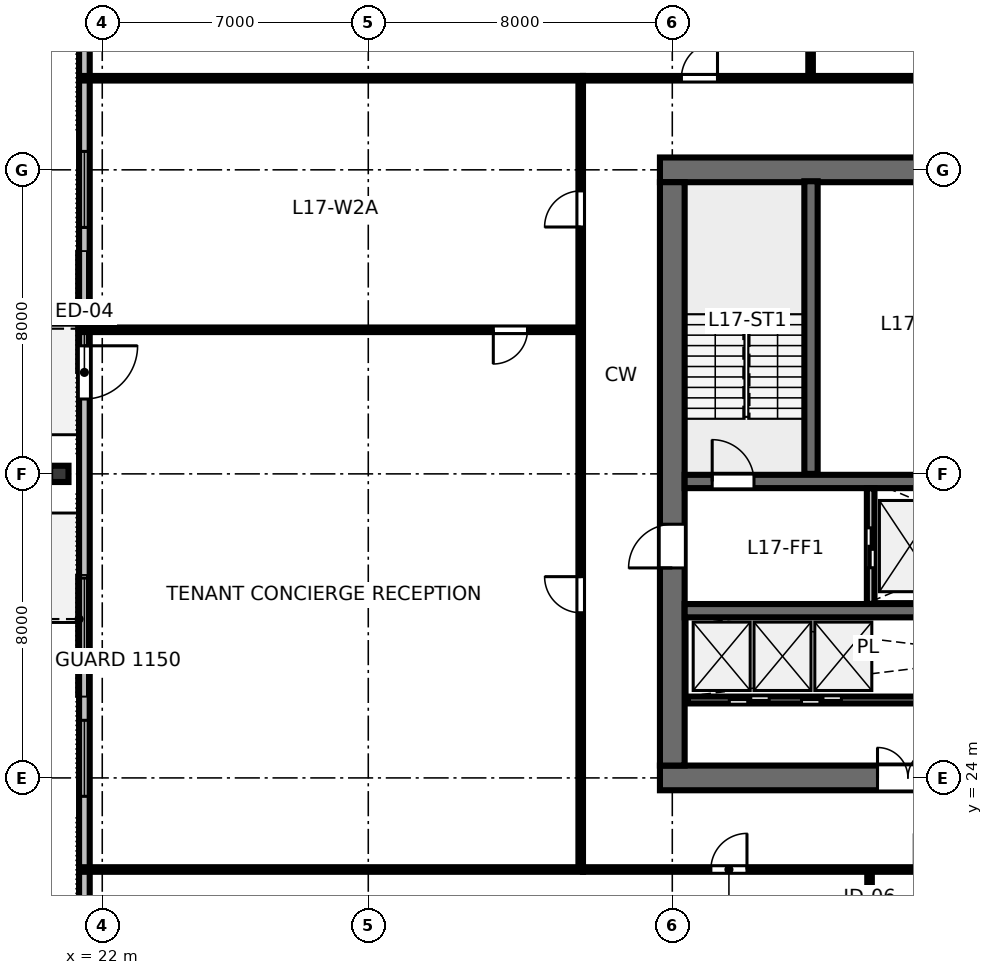
"""IFC4 building model, lengths in metres.
Left out: names, types, materials, properties, quantities, classifications, styles, units other than length and angle.
Written with IfcOpenShell. Run it as: python <this file> out.ifc"""

import sys

from ifc_helpers import new_model, si_unit, direction, frame, frame_2d, origin, origin_2d, place, context, subcontext, project, spatial, rectangle, i_section, extrude, element, fill, save


model = new_model("IFC4")
c1 = context("Model", 3, precision=1e-05, world=origin(), true_north=direction((0.0, 1.0)))
c2 = subcontext(c1, "Body", "Model", "MODEL_VIEW")
j1 = project(units=[si_unit("LENGTHUNIT", "METRE"), si_unit("PLANEANGLEUNIT", "RADIAN")], contexts=[c1])
p1 = place(None, origin())
s1 = spatial("IfcSite", under=j1, at=p1, CompositionType="ELEMENT")
p2 = place(p1, origin())
s2 = spatial("IfcBuilding", under=s1, at=p2, CompositionType="ELEMENT")
p3 = place(p2, frame((0.0, 0.0, 67.6)))
s3 = spatial("IfcBuildingStorey", under=s2, at=p3, CompositionType="ELEMENT", Elevation=67.6)
p4 = place(p3, frame((36.675, 24.0, 0.0), z_axis=(0.0, 0.0, 1.0), x_axis=(1.0, 0.0, 0.0)))
e1 = element("IfcWall", 1, at=p4, inside=s3, PredefinedType="SHEAR", context=c2, shape_type="SweptSolid", body=[
    extrude(rectangle(XDim=18.65, YDim=0.65, at=frame_2d((9.325, 0.0))), origin(), (0.0, 0.0, 1.0), 3.36),
])
p5 = place(p4, frame((5.725, 0.0, 0.0)))
e2 = element("IfcOpeningElement", 2, at=p5, cuts=e1, PredefinedType="OPENING", context=c2, shape_type="SweptSolid", body=[
    extrude(rectangle(XDim=1.6, YDim=2.15, at=frame_2d((0.8, 1.075))), frame((0.0, 0.335, 0.0), z_axis=(0.0, -1.0, 0.0), x_axis=(1.0, 0.0, 0.0)), (0.0, 0.0, 1.0), 0.67),
])
p6 = place(p4, frame((12.125, 0.0, 0.0)))
e3 = element("IfcOpeningElement", 3, at=p6, cuts=e1, PredefinedType="OPENING", context=c2, shape_type="SweptSolid", body=[
    extrude(rectangle(XDim=1.6, YDim=2.15, at=frame_2d((0.8, 1.075))), frame((0.0, 0.335, 0.0), z_axis=(0.0, -1.0, 0.0), x_axis=(1.0, 0.0, 0.0)), (0.0, 0.0, 1.0), 0.67),
])
p7 = place(p3, frame((36.675, 40.0, 0.0), z_axis=(0.0, 0.0, 1.0), x_axis=(1.0, 0.0, 0.0)))
e4 = element("IfcWall", 4, at=p7, inside=s3, PredefinedType="SHEAR", context=c2, shape_type="SweptSolid", body=[
    extrude(rectangle(XDim=18.65, YDim=0.65, at=frame_2d((9.325, 0.0))), origin(), (0.0, 0.0, 1.0), 3.36),
])
p8 = place(p7, frame((10.625, 0.0, 0.0)))
e5 = element("IfcOpeningElement", 5, at=p8, cuts=e4, PredefinedType="OPENING", context=c2, shape_type="SweptSolid", body=[
    extrude(rectangle(XDim=1.0, YDim=2.15, at=frame_2d((0.5, 1.075))), frame((0.0, 0.335, 0.0), z_axis=(0.0, -1.0, 0.0), x_axis=(1.0, 0.0, 0.0)), (0.0, 0.0, 1.0), 0.67),
])
p9 = place(p3, frame((37.0, 24.325, 0.0), z_axis=(0.0, 0.0, 1.0), x_axis=(0.0, 1.0, 0.0)))
e6 = element("IfcWall", 6, at=p9, inside=s3, PredefinedType="SHEAR", context=c2, shape_type="SweptSolid", body=[
    extrude(rectangle(XDim=15.35, YDim=0.65, at=frame_2d((7.675, 0.0))), origin(), (0.0, 0.0, 1.0), 3.36),
])
p10 = place(p9, frame((5.2, 0.0, 0.0)))
e7 = element("IfcOpeningElement", 7, at=p10, cuts=e6, PredefinedType="OPENING", context=c2, shape_type="SweptSolid", body=[
    extrude(rectangle(XDim=1.15, YDim=2.15, at=frame_2d((0.575, 1.075))), frame((0.0, 0.335, 0.0), z_axis=(0.0, -1.0, 0.0), x_axis=(1.0, 0.0, 0.0)), (0.0, 0.0, 1.0), 0.67),
])
p11 = place(p3, frame((37.325, 31.8, 0.0), z_axis=(0.0, 0.0, 1.0), x_axis=(1.0, 0.0, 0.0)))
e8 = element("IfcWall", 8, at=p11, inside=s3, PredefinedType="SHEAR", context=c2, shape_type="SweptSolid", body=[
    extrude(rectangle(XDim=17.35, YDim=0.35, at=frame_2d((8.675, 0.0))), origin(), (0.0, 0.0, 1.0), 3.36),
])
p12 = place(p11, frame((0.725, 0.0, 0.0)))
e9 = element("IfcOpeningElement", 9, at=p12, cuts=e8, PredefinedType="OPENING", context=c2, shape_type="SweptSolid", body=[
    extrude(rectangle(XDim=1.1, YDim=2.15, at=frame_2d((0.55, 1.075))), frame((0.0, 0.185, 0.0), z_axis=(0.0, -1.0, 0.0), x_axis=(1.0, 0.0, 0.0)), (0.0, 0.0, 1.0), 0.37),
])
p13 = place(p11, frame((14.625, 0.0, 0.0)))
e10 = element("IfcOpeningElement", 10, at=p13, cuts=e8, PredefinedType="OPENING", context=c2, shape_type="SweptSolid", body=[
    extrude(rectangle(XDim=1.1, YDim=2.15, at=frame_2d((0.55, 1.075))), frame((0.0, 0.185, 0.0), z_axis=(0.0, -1.0, 0.0), x_axis=(1.0, 0.0, 0.0)), (0.0, 0.0, 1.0), 0.37),
])
p14 = place(p3, frame((37.325, 28.4, 0.0), z_axis=(0.0, 0.0, 1.0), x_axis=(1.0, 0.0, 0.0)))
e11 = element("IfcWall", 11, at=p14, inside=s3, PredefinedType="SHEAR", context=c2, shape_type="SweptSolid", body=[
    extrude(rectangle(XDim=17.35, YDim=0.35, at=frame_2d((8.675, 0.0))), origin(), (0.0, 0.0, 1.0), 3.36),
])
p15 = place(p3, frame((20.87, 32.0, 0.0), z_axis=(-0.103698486948, 0.0, 0.994608779272), x_axis=(0.994608779272, 0.0, 0.103698486948)))
e12 = element("IfcColumn", 12, at=p15, inside=s3, PredefinedType="COLUMN", context=c2, shape_type="SweptSolid", body=[
    extrude(i_section(OverallWidth=0.428, OverallDepth=0.483, WebThickness=0.051, FlangeThickness=0.082, FilletRadius=0.025, at=origin_2d()), origin(), (0.0, 0.0, 1.0), 3.376),
])
p16 = place(p3, frame((21.53, 49.94, 0.0), z_axis=(0.0, 0.0, 1.0), x_axis=(0.0, -1.0, 0.0)))
e13 = element("IfcWall", 13, at=p16, inside=s3, PredefinedType="STANDARD", context=c2, shape_type="SweptSolid", body=[
    extrude(rectangle(XDim=35.88, YDim=0.28, at=frame_2d((17.94, 0.0))), origin(), (0.0, 0.0, 1.0), 3.36),
])
p17 = place(p16, frame((14.57, 0.0, 0.0)))
e14 = element("IfcOpeningElement", 14, at=p17, cuts=e13, PredefinedType="OPENING", context=c2, shape_type="SweptSolid", body=[
    extrude(rectangle(XDim=1.4, YDim=2.15, at=frame_2d((0.7, 1.075))), frame((0.0, 0.15, 0.0), z_axis=(0.0, -1.0, 0.0), x_axis=(1.0, 0.0, 0.0)), (0.0, 0.0, 1.0), 0.3),
])
p18 = place(p16, frame((1.971, 0.0, 0.8)))
e15 = element("IfcOpeningElement", 15, at=p18, cuts=e13, PredefinedType="OPENING", context=c2, shape_type="SweptSolid", body=[
    extrude(rectangle(XDim=2.0, YDim=1.95, at=frame_2d((1.0, 0.975))), frame((0.0, 0.15, 0.0), z_axis=(0.0, -1.0, 0.0), x_axis=(1.0, 0.0, 0.0)), (0.0, 0.0, 1.0), 0.3),
])
p19 = place(p16, frame((9.456, 0.0, 0.8)))
e16 = element("IfcOpeningElement", 16, at=p19, cuts=e13, PredefinedType="OPENING", context=c2, shape_type="SweptSolid", body=[
    extrude(rectangle(XDim=2.0, YDim=1.95, at=frame_2d((1.0, 0.975))), frame((0.0, 0.15, 0.0), z_axis=(0.0, -1.0, 0.0), x_axis=(1.0, 0.0, 0.0)), (0.0, 0.0, 1.0), 0.3),
])
p20 = place(p16, frame((20.682, 0.0, 0.8)))
e17 = element("IfcOpeningElement", 17, at=p20, cuts=e13, PredefinedType="OPENING", context=c2, shape_type="SweptSolid", body=[
    extrude(rectangle(XDim=2.0, YDim=1.95, at=frame_2d((1.0, 0.975))), frame((0.0, 0.15, 0.0), z_axis=(0.0, -1.0, 0.0), x_axis=(1.0, 0.0, 0.0)), (0.0, 0.0, 1.0), 0.3),
])
p21 = place(p16, frame((24.424, 0.0, 0.8)))
e18 = element("IfcOpeningElement", 18, at=p21, cuts=e13, PredefinedType="OPENING", context=c2, shape_type="SweptSolid", body=[
    extrude(rectangle(XDim=2.0, YDim=1.95, at=frame_2d((1.0, 0.975))), frame((0.0, 0.15, 0.0), z_axis=(0.0, -1.0, 0.0), x_axis=(1.0, 0.0, 0.0)), (0.0, 0.0, 1.0), 0.3),
])
p22 = place(p16, frame((31.909, 0.0, 0.8)))
e19 = element("IfcOpeningElement", 19, at=p22, cuts=e13, PredefinedType="OPENING", context=c2, shape_type="SweptSolid", body=[
    extrude(rectangle(XDim=2.0, YDim=1.95, at=frame_2d((1.0, 0.975))), frame((0.0, 0.15, 0.0), z_axis=(0.0, -1.0, 0.0), x_axis=(1.0, 0.0, 0.0)), (0.0, 0.0, 1.0), 0.3),
])
p23 = place(p3, frame((40.65, 32.0, 0.0), z_axis=(0.0, 0.0, 1.0), x_axis=(0.0, 1.0, 0.0)))
e20 = element("IfcWall", 20, at=p23, inside=s3, PredefinedType="SHEAR", context=c2, shape_type="SweptSolid", body=[
    extrude(rectangle(XDim=7.7, YDim=0.35, at=frame_2d((3.85, 0.0))), origin(), (0.0, 0.0, 1.0), 3.6),
])
p24 = place(p3, frame((42.22, 28.58, 0.0), z_axis=(0.0, 0.0, 1.0), x_axis=(0.0, 1.0, 0.0)))
e21 = element("IfcWall", 21, at=p24, inside=s3, PredefinedType="PARTITIONING", context=c2, shape_type="SweptSolid", body=[
    extrude(rectangle(XDim=3.04, YDim=0.2, at=frame_2d((1.52, 0.0))), origin(), (0.0, 0.0, 1.0), 3.36),
])
p25 = place(p24, frame((0.95, 0.0, 0.0)))
e22 = element("IfcOpeningElement", 22, at=p25, cuts=e21, PredefinedType="OPENING", context=c2, shape_type="SweptSolid", body=[
    extrude(rectangle(XDim=1.05, YDim=2.15, at=frame_2d((0.525, 1.075))), frame((0.0, 0.11, 0.0), z_axis=(0.0, -1.0, 0.0), x_axis=(1.0, 0.0, 0.0)), (0.0, 0.0, 1.0), 0.22),
])
p26 = place(p3, frame((37.4, 26.05, 0.0), z_axis=(0.0, 0.0, 1.0), x_axis=(1.0, 0.0, 0.0)))
e23 = element("IfcWall", 23, at=p26, inside=s3, PredefinedType="PARTITIONING", context=c2, shape_type="SweptSolid", body=[
    extrude(rectangle(XDim=17.2, YDim=0.18, at=frame_2d((8.6, 0.0))), origin(), (0.0, 0.0, 1.0), 3.36),
])
p27 = place(p26, frame((1.1, 0.0, 0.0)))
e24 = element("IfcOpeningElement", 24, at=p27, cuts=e23, PredefinedType="OPENING", context=c2, shape_type="SweptSolid", body=[
    extrude(rectangle(XDim=1.05, YDim=2.15, at=frame_2d((0.525, 1.075))), frame((0.0, 0.1, 0.0), z_axis=(0.0, -1.0, 0.0), x_axis=(1.0, 0.0, 0.0)), (0.0, 0.0, 1.0), 0.2),
])
p28 = place(p26, frame((3.0, 0.0, 0.0)))
e25 = element("IfcOpeningElement", 25, at=p28, cuts=e23, PredefinedType="OPENING", context=c2, shape_type="SweptSolid", body=[
    extrude(rectangle(XDim=1.05, YDim=2.15, at=frame_2d((0.525, 1.075))), frame((0.0, 0.1, 0.0), z_axis=(0.0, -1.0, 0.0), x_axis=(1.0, 0.0, 0.0)), (0.0, 0.0, 1.0), 0.2),
])
p29 = place(p3, frame((42.191, 21.59, 0.0), z_axis=(0.0, 0.0, 1.0), x_axis=(0.0, -1.0, 0.0)))
e26 = element("IfcWall", 26, at=p29, inside=s3, PredefinedType="PARTITIONING", context=c2, shape_type="SweptSolid", body=[
    extrude(rectangle(XDim=11.11, YDim=0.12, at=frame_2d((5.555, 0.0))), origin(), (0.0, 0.0, 1.0), 2.64),
])
p30 = place(p29, frame((1.4, 0.0, 0.0)))
e27 = element("IfcOpeningElement", 27, at=p30, cuts=e26, PredefinedType="OPENING", context=c2, shape_type="SweptSolid", body=[
    extrude(rectangle(XDim=0.9, YDim=2.15, at=frame_2d((0.45, 1.075))), frame((0.0, 0.07, 0.0), z_axis=(0.0, -1.0, 0.0), x_axis=(1.0, 0.0, 0.0)), (0.0, 0.0, 1.0), 0.14),
])
p31 = place(p3, frame((34.65, 21.59, 0.0), z_axis=(0.0, 0.0, 1.0), x_axis=(1.0, 0.0, 0.0)))
e28 = element("IfcWall", 28, at=p31, inside=s3, PredefinedType="PARTITIONING", context=c2, shape_type="SweptSolid", body=[
    extrude(rectangle(XDim=22.7, YDim=0.12, at=frame_2d((11.35, 0.0))), origin(), (0.0, 0.0, 1.0), 2.64),
])
p32 = place(p31, frame((3.365, 0.0, 0.0)))
e29 = element("IfcOpeningElement", 29, at=p32, cuts=e28, PredefinedType="OPENING", context=c2, shape_type="SweptSolid", body=[
    extrude(rectangle(XDim=0.95, YDim=2.15, at=frame_2d((0.475, 1.075))), frame((0.0, 0.07, 0.0), z_axis=(0.0, -1.0, 0.0), x_axis=(1.0, 0.0, 0.0)), (0.0, 0.0, 1.0), 0.14),
])
p33 = place(p31, frame((8.718, 0.0, 0.0)))
e30 = element("IfcOpeningElement", 30, at=p33, cuts=e28, PredefinedType="OPENING", context=c2, shape_type="SweptSolid", body=[
    extrude(rectangle(XDim=0.95, YDim=2.15, at=frame_2d((0.475, 1.075))), frame((0.0, 0.07, 0.0), z_axis=(0.0, -1.0, 0.0), x_axis=(1.0, 0.0, 0.0)), (0.0, 0.0, 1.0), 0.14),
])
p34 = place(p31, frame((13.651, 0.0, 0.0)))
e31 = element("IfcOpeningElement", 31, at=p34, cuts=e28, PredefinedType="OPENING", context=c2, shape_type="SweptSolid", body=[
    extrude(rectangle(XDim=0.95, YDim=2.15, at=frame_2d((0.475, 1.075))), frame((0.0, 0.07, 0.0), z_axis=(0.0, -1.0, 0.0), x_axis=(1.0, 0.0, 0.0)), (0.0, 0.0, 1.0), 0.14),
])
p35 = place(p31, frame((19.509, 0.0, 0.0)))
e32 = element("IfcOpeningElement", 32, at=p35, cuts=e28, PredefinedType="OPENING", context=c2, shape_type="SweptSolid", body=[
    extrude(rectangle(XDim=0.95, YDim=2.15, at=frame_2d((0.475, 1.075))), frame((0.0, 0.07, 0.0), z_axis=(0.0, -1.0, 0.0), x_axis=(1.0, 0.0, 0.0)), (0.0, 0.0, 1.0), 0.14),
])
p36 = place(p3, frame((40.639, 42.41, 0.0), z_axis=(0.0, 0.0, 1.0), x_axis=(0.0, 1.0, 0.0)))
e33 = element("IfcWall", 33, at=p36, inside=s3, PredefinedType="PARTITIONING", context=c2, shape_type="SweptSolid", body=[
    extrude(rectangle(XDim=11.11, YDim=0.12, at=frame_2d((5.555, 0.0))), origin(), (0.0, 0.0, 1.0), 2.64),
])
p37 = place(p36, frame((1.4, 0.0, 0.0)))
e34 = element("IfcOpeningElement", 34, at=p37, cuts=e33, PredefinedType="OPENING", context=c2, shape_type="SweptSolid", body=[
    extrude(rectangle(XDim=0.9, YDim=2.15, at=frame_2d((0.45, 1.075))), frame((0.0, 0.07, 0.0), z_axis=(0.0, -1.0, 0.0), x_axis=(1.0, 0.0, 0.0)), (0.0, 0.0, 1.0), 0.14),
])
p38 = place(p3, frame((34.65, 42.41, 0.0), z_axis=(0.0, 0.0, 1.0), x_axis=(1.0, 0.0, 0.0)))
e35 = element("IfcWall", 35, at=p38, inside=s3, PredefinedType="PARTITIONING", context=c2, shape_type="SweptSolid", body=[
    extrude(rectangle(XDim=22.7, YDim=0.12, at=frame_2d((11.35, 0.0))), origin(), (0.0, 0.0, 1.0), 2.64),
])
p39 = place(p38, frame((2.59, 0.0, 0.0)))
e36 = element("IfcOpeningElement", 36, at=p39, cuts=e35, PredefinedType="OPENING", context=c2, shape_type="SweptSolid", body=[
    extrude(rectangle(XDim=0.95, YDim=2.15, at=frame_2d((0.475, 1.075))), frame((0.0, 0.07, 0.0), z_axis=(0.0, -1.0, 0.0), x_axis=(1.0, 0.0, 0.0)), (0.0, 0.0, 1.0), 0.14),
])
p40 = place(p38, frame((8.768, 0.0, 0.0)))
e37 = element("IfcOpeningElement", 37, at=p40, cuts=e35, PredefinedType="OPENING", context=c2, shape_type="SweptSolid", body=[
    extrude(rectangle(XDim=0.95, YDim=2.15, at=frame_2d((0.475, 1.075))), frame((0.0, 0.07, 0.0), z_axis=(0.0, -1.0, 0.0), x_axis=(1.0, 0.0, 0.0)), (0.0, 0.0, 1.0), 0.14),
])
p41 = place(p38, frame((14.079, 0.0, 0.0)))
e38 = element("IfcOpeningElement", 38, at=p41, cuts=e35, PredefinedType="OPENING", context=c2, shape_type="SweptSolid", body=[
    extrude(rectangle(XDim=0.95, YDim=2.15, at=frame_2d((0.475, 1.075))), frame((0.0, 0.07, 0.0), z_axis=(0.0, -1.0, 0.0), x_axis=(1.0, 0.0, 0.0)), (0.0, 0.0, 1.0), 0.14),
])
p42 = place(p38, frame((19.11, 0.0, 0.0)))
e39 = element("IfcOpeningElement", 39, at=p42, cuts=e35, PredefinedType="OPENING", context=c2, shape_type="SweptSolid", body=[
    extrude(rectangle(XDim=0.95, YDim=2.15, at=frame_2d((0.475, 1.075))), frame((0.0, 0.07, 0.0), z_axis=(0.0, -1.0, 0.0), x_axis=(1.0, 0.0, 0.0)), (0.0, 0.0, 1.0), 0.14),
])
p43 = place(p3, frame((34.59, 35.791, 0.0), z_axis=(0.0, 0.0, 1.0), x_axis=(-1.0, 0.0, 0.0)))
e40 = element("IfcWall", 40, at=p43, inside=s3, PredefinedType="PARTITIONING", context=c2, shape_type="SweptSolid", body=[
    extrude(rectangle(XDim=13.06, YDim=0.12, at=frame_2d((6.53, 0.0))), origin(), (0.0, 0.0, 1.0), 2.64),
])
p44 = place(p43, frame((1.4, 0.0, 0.0)))
e41 = element("IfcOpeningElement", 41, at=p44, cuts=e40, PredefinedType="OPENING", context=c2, shape_type="SweptSolid", body=[
    extrude(rectangle(XDim=0.9, YDim=2.15, at=frame_2d((0.45, 1.075))), frame((0.0, 0.07, 0.0), z_axis=(0.0, -1.0, 0.0), x_axis=(1.0, 0.0, 0.0)), (0.0, 0.0, 1.0), 0.14),
])
p45 = place(p3, frame((34.59, 21.65, 0.0), z_axis=(0.0, 0.0, 1.0), x_axis=(0.0, 1.0, 0.0)))
e42 = element("IfcWall", 42, at=p45, inside=s3, PredefinedType="PARTITIONING", context=c2, shape_type="SweptSolid", body=[
    extrude(rectangle(XDim=20.7, YDim=0.12, at=frame_2d((10.35, 0.0))), origin(), (0.0, 0.0, 1.0), 2.64),
])
p46 = place(p45, frame((6.696, 0.0, 0.0)))
e43 = element("IfcOpeningElement", 43, at=p46, cuts=e42, PredefinedType="OPENING", context=c2, shape_type="SweptSolid", body=[
    extrude(rectangle(XDim=0.95, YDim=2.15, at=frame_2d((0.475, 1.075))), frame((0.0, 0.07, 0.0), z_axis=(0.0, -1.0, 0.0), x_axis=(1.0, 0.0, 0.0)), (0.0, 0.0, 1.0), 0.14),
])
p47 = place(p45, frame((16.846, 0.0, 0.0)))
e44 = element("IfcOpeningElement", 44, at=p47, cuts=e42, PredefinedType="OPENING", context=c2, shape_type="SweptSolid", body=[
    extrude(rectangle(XDim=0.95, YDim=2.15, at=frame_2d((0.475, 1.075))), frame((0.0, 0.07, 0.0), z_axis=(0.0, -1.0, 0.0), x_axis=(1.0, 0.0, 0.0)), (0.0, 0.0, 1.0), 0.14),
])
for number, where, z_axis, x_axis in (
    (45, (34.65, 21.59, 0.0), (0.0, 0.0, 1.0), (-1.0, 0.0, 0.0)),
    (46, (34.65, 42.41, 0.0), (0.0, 0.0, 1.0), (-1.0, 0.0, 0.0)),
):
    element("IfcWall", number, at=place(p3, frame(where, z_axis=z_axis, x_axis=x_axis)), inside=s3, PredefinedType="PARTITIONING", context=c2, shape_type="SweptSolid", body=[
        extrude(rectangle(XDim=13.12, YDim=0.12, at=frame_2d((6.56, 0.0))), origin(), (0.0, 0.0, 1.0), 2.64),
    ])
p48 = place(p17, origin())
e47 = element("IfcDoor", 47, at=p48, inside=s3, OperationType="SINGLE_SWING_LEFT", PredefinedType="DOOR", context=c2, shape_type="SweptSolid", body=[
    extrude(rectangle(XDim=1.4, YDim=2.15, at=frame_2d((0.7, 1.075))), frame((0.0, 0.025, 0.0), z_axis=(0.0, -1.0, 0.0), x_axis=(1.0, 0.0, 0.0)), (0.0, 0.0, 1.0), 0.05),
])
fill(e14, e47)
p49 = place(p19, origin())
e48 = element("IfcWindow", 48, at=p49, inside=s3, PartitioningType="SINGLE_PANEL", PredefinedType="WINDOW", context=c2, shape_type="SweptSolid", body=[
    extrude(rectangle(XDim=2.0, YDim=1.95, at=frame_2d((1.0, 0.975))), frame((0.0, 0.03, 0.0), z_axis=(0.0, -1.0, 0.0), x_axis=(1.0, 0.0, 0.0)), (0.0, 0.0, 1.0), 0.06),
])
fill(e16, e48)
p50 = place(p20, origin())
e49 = element("IfcWindow", 49, at=p50, inside=s3, PartitioningType="SINGLE_PANEL", PredefinedType="WINDOW", context=c2, shape_type="SweptSolid", body=[
    extrude(rectangle(XDim=2.0, YDim=1.95, at=frame_2d((1.0, 0.975))), frame((0.0, 0.03, 0.0), z_axis=(0.0, -1.0, 0.0), x_axis=(1.0, 0.0, 0.0)), (0.0, 0.0, 1.0), 0.06),
])
fill(e17, e49)
p51 = place(p21, origin())
e50 = element("IfcWindow", 50, at=p51, inside=s3, PartitioningType="SINGLE_PANEL", PredefinedType="WINDOW", context=c2, shape_type="SweptSolid", body=[
    extrude(rectangle(XDim=2.0, YDim=1.95, at=frame_2d((1.0, 0.975))), frame((0.0, 0.03, 0.0), z_axis=(0.0, -1.0, 0.0), x_axis=(1.0, 0.0, 0.0)), (0.0, 0.0, 1.0), 0.06),
])
fill(e18, e50)
p52 = place(p12, origin())
e51 = element("IfcDoor", 51, at=p52, inside=s3, OperationType="SINGLE_SWING_LEFT", PredefinedType="DOOR", context=c2, shape_type="SweptSolid", body=[
    extrude(rectangle(XDim=1.1, YDim=2.15, at=frame_2d((0.55, 1.075))), frame((0.0, 0.025, 0.0), z_axis=(0.0, -1.0, 0.0), x_axis=(1.0, 0.0, 0.0)), (0.0, 0.0, 1.0), 0.05),
])
fill(e9, e51)
p53 = place(p10, origin())
e52 = element("IfcDoor", 52, at=p53, inside=s3, OperationType="SINGLE_SWING_LEFT", PredefinedType="DOOR", context=c2, shape_type="SweptSolid", body=[
    extrude(rectangle(XDim=1.15, YDim=2.15, at=frame_2d((0.575, 1.075))), frame((0.0, 0.025, 0.0), z_axis=(0.0, -1.0, 0.0), x_axis=(1.0, 0.0, 0.0)), (0.0, 0.0, 1.0), 0.05),
])
fill(e7, e52)
p54 = place(p5, origin())
e53 = element("IfcDoor", 53, at=p54, inside=s3, OperationType="DOUBLE_DOOR_SINGLE_SWING", PredefinedType="DOOR", context=c2, shape_type="SweptSolid", body=[
    extrude(rectangle(XDim=1.6, YDim=2.15, at=frame_2d((0.8, 1.075))), frame((0.0, 0.025, 0.0), z_axis=(0.0, -1.0, 0.0), x_axis=(1.0, 0.0, 0.0)), (0.0, 0.0, 1.0), 0.05),
])
fill(e2, e53)
p55 = place(p25, origin())
e54 = element("IfcDoor", 54, at=p55, inside=s3, OperationType="SLIDING_TO_LEFT", PredefinedType="DOOR", context=c2, shape_type="SweptSolid", body=[
    extrude(rectangle(XDim=1.05, YDim=2.15, at=frame_2d((0.525, 1.075))), frame((0.0, 0.025, 0.0), z_axis=(0.0, -1.0, 0.0), x_axis=(1.0, 0.0, 0.0)), (0.0, 0.0, 1.0), 0.05),
])
fill(e22, e54)
p56 = place(p27, origin())
e55 = element("IfcDoor", 55, at=p56, inside=s3, OperationType="SLIDING_TO_LEFT", PredefinedType="DOOR", context=c2, shape_type="SweptSolid", body=[
    extrude(rectangle(XDim=1.05, YDim=2.15, at=frame_2d((0.525, 1.075))), frame((0.0, 0.025, 0.0), z_axis=(0.0, -1.0, 0.0), x_axis=(1.0, 0.0, 0.0)), (0.0, 0.0, 1.0), 0.05),
])
fill(e24, e55)
p57 = place(p28, origin())
e56 = element("IfcDoor", 56, at=p57, inside=s3, OperationType="SLIDING_TO_RIGHT", PredefinedType="DOOR", context=c2, shape_type="SweptSolid", body=[
    extrude(rectangle(XDim=1.05, YDim=2.15, at=frame_2d((0.525, 1.075))), frame((0.0, 0.025, 0.0), z_axis=(0.0, -1.0, 0.0), x_axis=(1.0, 0.0, 0.0)), (0.0, 0.0, 1.0), 0.05),
])
fill(e25, e56)
p58 = place(p32, origin())
e57 = element("IfcDoor", 57, at=p58, inside=s3, OperationType="SINGLE_SWING_RIGHT", PredefinedType="DOOR", context=c2, shape_type="SweptSolid", body=[
    extrude(rectangle(XDim=0.95, YDim=2.15, at=frame_2d((0.475, 1.075))), frame((0.0, 0.025, 0.0), z_axis=(0.0, -1.0, 0.0), x_axis=(1.0, 0.0, 0.0)), (0.0, 0.0, 1.0), 0.05),
])
fill(e29, e57)
p59 = place(p39, origin())
e58 = element("IfcDoor", 58, at=p59, inside=s3, OperationType="SINGLE_SWING_RIGHT", PredefinedType="DOOR", context=c2, shape_type="SweptSolid", body=[
    extrude(rectangle(XDim=0.95, YDim=2.15, at=frame_2d((0.475, 1.075))), frame((0.0, 0.025, 0.0), z_axis=(0.0, -1.0, 0.0), x_axis=(1.0, 0.0, 0.0)), (0.0, 0.0, 1.0), 0.05),
])
fill(e36, e58)
p60 = place(p44, origin())
e59 = element("IfcDoor", 59, at=p60, inside=s3, OperationType="SINGLE_SWING_RIGHT", PredefinedType="DOOR", context=c2, shape_type="SweptSolid", body=[
    extrude(rectangle(XDim=0.9, YDim=2.15, at=frame_2d((0.45, 1.075))), frame((0.0, 0.025, 0.0), z_axis=(0.0, -1.0, 0.0), x_axis=(1.0, 0.0, 0.0)), (0.0, 0.0, 1.0), 0.05),
])
fill(e41, e59)
p61 = place(p46, origin())
e60 = element("IfcDoor", 60, at=p61, inside=s3, OperationType="SINGLE_SWING_RIGHT", PredefinedType="DOOR", context=c2, shape_type="SweptSolid", body=[
    extrude(rectangle(XDim=0.95, YDim=2.15, at=frame_2d((0.475, 1.075))), frame((0.0, 0.025, 0.0), z_axis=(0.0, -1.0, 0.0), x_axis=(1.0, 0.0, 0.0)), (0.0, 0.0, 1.0), 0.05),
])
fill(e43, e60)
p62 = place(p47, origin())
e61 = element("IfcDoor", 61, at=p62, inside=s3, OperationType="SINGLE_SWING_LEFT", PredefinedType="DOOR", context=c2, shape_type="SweptSolid", body=[
    extrude(rectangle(XDim=0.95, YDim=2.15, at=frame_2d((0.475, 1.075))), frame((0.0, 0.025, 0.0), z_axis=(0.0, -1.0, 0.0), x_axis=(1.0, 0.0, 0.0)), (0.0, 0.0, 1.0), 0.05),
])
fill(e44, e61)
save(model, sys.argv[1])
